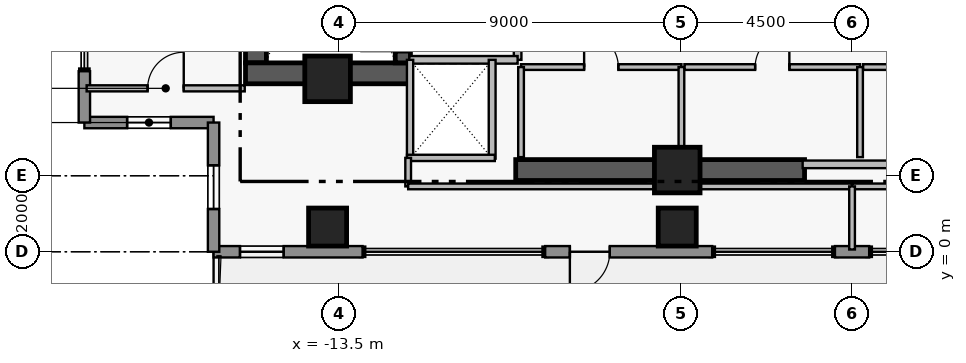
"""IFC4 building model, lengths in metres.
Left out: names, types, materials, properties, quantities, classifications, styles, units other than length and angle.
Written with IfcOpenShell. Run it as: python <this file> out.ifc"""

import sys

from ifc_helpers import new_model, si_unit, direction, frame, frame_2d, origin, origin_2d, place, context, subcontext, project, spatial, rectangle, extrude, element, fill, save


model = new_model("IFC4")
c1 = context("Model", 3, precision=1e-05, world=origin(), true_north=direction((0.0, 1.0)))
c2 = subcontext(c1, "Body", "Model", "MODEL_VIEW")
j1 = project(units=[si_unit("LENGTHUNIT", "METRE"), si_unit("PLANEANGLEUNIT", "RADIAN")], contexts=[c1])
p1 = place(None, origin())
s1 = spatial("IfcSite", under=j1, at=p1, CompositionType="ELEMENT")
p2 = place(p1, origin())
s2 = spatial("IfcBuilding", under=s1, at=p2, CompositionType="ELEMENT")
p3 = place(p2, frame((0.0, 0.0, 254.45)))
s3 = spatial("IfcBuildingStorey", under=s2, at=p3, CompositionType="ELEMENT", Elevation=254.45)
p4 = place(p3, frame((-15.685, 4.97, 0.0), z_axis=(0.0, 0.0, 1.0), x_axis=(0.0, 1.0, 0.0)))
e1 = element("IfcWall", 1, at=p4, inside=s3, PredefinedType="SHEAR", context=c2, shape_type="SweptSolid", body=[
    extrude(rectangle(XDim=8.96, YDim=0.55, at=frame_2d((4.48, 0.0))), origin(), (0.0, 0.0, 1.0), 3.51),
])
p5 = place(p3, frame((-15.96, 4.695, 0.0), z_axis=(0.0, 0.0, 1.0), x_axis=(1.0, 0.0, 0.0)))
e2 = element("IfcWall", 2, at=p5, inside=s3, PredefinedType="SHEAR", context=c2, shape_type="SweptSolid", body=[
    extrude(rectangle(XDim=4.36, YDim=0.55, at=frame_2d((2.18, 0.0))), origin(), (0.0, 0.0, 1.0), 3.51),
])
p6 = place(p3, frame((-8.85, 2.15, 0.0), z_axis=(0.0, 0.0, 1.0), x_axis=(1.0, 0.0, 0.0)))
e3 = element("IfcWall", 3, at=p6, inside=s3, PredefinedType="SHEAR", context=c2, shape_type="SweptSolid", body=[
    extrude(rectangle(XDim=7.6, YDim=0.55, at=frame_2d((3.8, 0.0))), origin(), (0.0, 0.0, 1.0), 3.48),
])
p7 = place(p3, frame((-11.82, 4.97, 0.0), z_axis=(0.0, 0.0, 1.0), x_axis=(0.0, 1.0, 0.0)))
e4 = element("IfcWall", 4, at=p7, inside=s3, PredefinedType="SHEAR", context=c2, shape_type="SweptSolid", body=[
    extrude(rectangle(XDim=8.96, YDim=0.4, at=frame_2d((4.48, 0.0))), origin(), (0.0, 0.0, 1.0), 3.51),
])
p8 = place(p7, frame((0.31, 0.0, 0.0)))
e5 = element("IfcOpeningElement", 5, at=p8, cuts=e4, PredefinedType="OPENING", context=c2, shape_type="SweptSolid", body=[
    extrude(rectangle(XDim=1.12, YDim=2.22, at=frame_2d((0.56, 1.11))), frame((0.0, 0.21, 0.0), z_axis=(0.0, -1.0, 0.0), x_axis=(1.0, 0.0, 0.0)), (0.0, 0.0, 1.0), 0.42),
])
for number, where, z_axis, x_axis in (
    (6, (-13.8, 4.55, 0.0), (0.0, 0.0, 1.0), (1.0, 0.0, 0.0)),
    (7, (-4.6, 2.15, 0.0), (0.0, 0.0, 1.0), (1.0, 0.0, 0.0)),
):
    element("IfcColumn", number, at=place(p3, frame(where, z_axis=z_axis, x_axis=x_axis)), inside=s3, PredefinedType="COLUMN", context=c2, shape_type="SweptSolid", body=[
        extrude(rectangle(XDim=1.2, YDim=1.2, at=origin_2d()), origin(), (0.0, 0.0, 1.0), 3.7),
    ])
for number, where, z_axis, x_axis in (
    (8, (-13.8, 0.65, 0.0), (0.0, 0.0, 1.0), (1.0, 0.0, 0.0)),
    (9, (-4.6, 0.65, 0.0), (0.0, 0.0, 1.0), (1.0, 0.0, 0.0)),
):
    element("IfcColumn", number, at=place(p3, frame(where, z_axis=z_axis, x_axis=x_axis)), inside=s3, PredefinedType="COLUMN", context=c2, shape_type="SweptSolid", body=[
        extrude(rectangle(XDim=1.0, YDim=1.0, at=origin_2d()), origin(), (0.0, 0.0, 1.0), 3.7),
    ])
p9 = place(p3, frame((-16.8, 3.4, 0.0), z_axis=(0.0, 0.0, 1.0), x_axis=(-1.0, 0.0, 0.0)))
e10 = element("IfcWall", 10, at=p9, inside=s3, PredefinedType="STANDARD", context=c2, shape_type="SweptSolid", body=[
    extrude(rectangle(XDim=3.4, YDim=0.3, at=frame_2d((1.7, 0.0))), origin(), (0.0, 0.0, 1.0), 3.48),
])
p10 = place(p9, frame((1.125, 0.0, 1.25)))
e11 = element("IfcOpeningElement", 11, at=p10, cuts=e10, PredefinedType="OPENING", context=c2, shape_type="SweptSolid", body=[
    extrude(rectangle(XDim=1.15, YDim=1.55, at=frame_2d((0.575, 0.775))), frame((0.0, 0.16, 0.0), z_axis=(0.0, -1.0, 0.0), x_axis=(1.0, 0.0, 0.0)), (0.0, 0.0, 1.0), 0.32),
])
p11 = place(p3, frame((-20.2, 3.4, 0.0), z_axis=(0.0, 0.0, 1.0), x_axis=(0.0, 1.0, 0.0)))
e12 = element("IfcWall", 12, at=p11, inside=s3, PredefinedType="STANDARD", context=c2, shape_type="SweptSolid", body=[
    extrude(rectangle(XDim=1.35, YDim=0.3, at=frame_2d((0.675, 0.0))), origin(), (0.0, 0.0, 1.0), 3.48),
])
p12 = place(p3, frame((0.45, 0.0, 0.0), z_axis=(0.0, 0.0, 1.0), x_axis=(-1.0, 0.0, 0.0)))
e13 = element("IfcWall", 13, at=p12, inside=s3, PredefinedType="STANDARD", context=c2, shape_type="SweptSolid", body=[
    extrude(rectangle(XDim=0.9, YDim=0.3, at=frame_2d((0.45, 0.0))), origin(), (0.0, 0.0, 1.0), 3.48),
])
p13 = place(p3, frame((-3.68, 0.0, 0.0), z_axis=(0.0, 0.0, 1.0), x_axis=(-1.0, 0.0, 0.0)))
e14 = element("IfcWall", 14, at=p13, inside=s3, PredefinedType="STANDARD", context=c2, shape_type="SweptSolid", body=[
    extrude(rectangle(XDim=4.395, YDim=0.3, at=frame_2d((2.198, 0.0))), origin(), (0.0, 0.0, 1.0), 3.48),
])
p14 = place(p13, frame((2.695, 0.0, 0.0)))
e15 = element("IfcOpeningElement", 15, at=p14, cuts=e14, PredefinedType="OPENING", context=c2, shape_type="SweptSolid", body=[
    extrude(rectangle(XDim=1.05, YDim=2.2, at=frame_2d((0.525, 1.1))), frame((0.0, 0.16, 0.0), z_axis=(0.0, -1.0, 0.0), x_axis=(1.0, 0.0, 0.0)), (0.0, 0.0, 1.0), 0.32),
])
p15 = place(p3, frame((-12.88, 0.0, 0.0), z_axis=(0.0, 0.0, 1.0), x_axis=(-1.0, 0.0, 0.0)))
e16 = element("IfcWall", 16, at=p15, inside=s3, PredefinedType="STANDARD", context=c2, shape_type="SweptSolid", body=[
    extrude(rectangle(XDim=3.92, YDim=0.3, at=frame_2d((1.96, 0.0))), origin(), (0.0, 0.0, 1.0), 3.48),
])
p16 = place(p15, frame((2.075, 0.0, 0.95)))
e17 = element("IfcOpeningElement", 17, at=p16, cuts=e16, PredefinedType="OPENING", context=c2, shape_type="SweptSolid", body=[
    extrude(rectangle(XDim=1.15, YDim=1.55, at=frame_2d((0.575, 0.775))), frame((0.0, 0.16, 0.0), z_axis=(0.0, -1.0, 0.0), x_axis=(1.0, 0.0, 0.0)), (0.0, 0.0, 1.0), 0.32),
])
p17 = place(p3, frame((-16.8, 0.0, 0.0), z_axis=(0.0, 0.0, 1.0), x_axis=(0.0, 1.0, 0.0)))
e18 = element("IfcWall", 18, at=p17, inside=s3, PredefinedType="STANDARD", context=c2, shape_type="SweptSolid", body=[
    extrude(rectangle(XDim=3.4, YDim=0.3, at=frame_2d((1.7, 0.0))), origin(), (0.0, 0.0, 1.0), 3.48),
])
p18 = place(p17, frame((1.125, 0.0, 1.25)))
e19 = element("IfcOpeningElement", 19, at=p18, cuts=e18, PredefinedType="OPENING", context=c2, shape_type="SweptSolid", body=[
    extrude(rectangle(XDim=1.15, YDim=1.55, at=frame_2d((0.575, 0.775))), frame((0.0, 0.16, 0.0), z_axis=(0.0, -1.0, 0.0), x_axis=(1.0, 0.0, 0.0)), (0.0, 0.0, 1.0), 0.32),
])
p19 = place(p3, frame((-8.8, 5.05, 0.0), z_axis=(0.0, 0.0, 1.0), x_axis=(0.0, 1.0, 0.0)))
e20 = element("IfcWall", 20, at=p19, inside=s3, PredefinedType="PARTITIONING", context=c2, shape_type="SweptSolid", body=[
    extrude(rectangle(XDim=6.1, YDim=0.2, at=frame_2d((3.05, 0.0))), origin(), (0.0, 0.0, 1.0), 3.48),
])
p20 = place(p19, frame((0.25, 0.0, 0.0)))
e21 = element("IfcOpeningElement", 21, at=p20, cuts=e20, PredefinedType="OPENING", context=c2, shape_type="SweptSolid", body=[
    extrude(rectangle(XDim=1.1, YDim=2.2, at=frame_2d((0.55, 1.1))), frame((0.0, 0.11, 0.0), z_axis=(0.0, -1.0, 0.0), x_axis=(1.0, 0.0, 0.0)), (0.0, 0.0, 1.0), 0.22),
])
p21 = place(p19, frame((3.85, 0.0, 0.0)))
e22 = element("IfcOpeningElement", 22, at=p21, cuts=e20, PredefinedType="OPENING", context=c2, shape_type="SweptSolid", body=[
    extrude(rectangle(XDim=1.1, YDim=2.2, at=frame_2d((0.55, 1.1))), frame((0.0, 0.11, 0.0), z_axis=(0.0, -1.0, 0.0), x_axis=(1.0, 0.0, 0.0)), (0.0, 0.0, 1.0), 0.22),
])
p22 = place(p3, frame((-8.71, 4.86, 0.0), z_axis=(0.0, 0.0, 1.0), x_axis=(1.0, 0.0, 0.0)))
e23 = element("IfcWall", 23, at=p22, inside=s3, PredefinedType="PARTITIONING", context=c2, shape_type="SweptSolid", body=[
    extrude(rectangle(XDim=4.22, YDim=0.15, at=frame_2d((2.11, 0.0))), origin(), (0.0, 0.0, 1.0), 3.48),
])
p23 = place(p22, frame((1.66, 0.0, 0.0)))
e24 = element("IfcOpeningElement", 24, at=p23, cuts=e23, PredefinedType="OPENING", context=c2, shape_type="SweptSolid", body=[
    extrude(rectangle(XDim=0.9, YDim=2.15, at=frame_2d((0.45, 1.075))), frame((0.0, 0.085, 0.0), z_axis=(0.0, -1.0, 0.0), x_axis=(1.0, 0.0, 0.0)), (0.0, 0.0, 1.0), 0.17),
])
p24 = place(p3, frame((-4.41, 4.86, 0.0), z_axis=(0.0, 0.0, 1.0), x_axis=(1.0, 0.0, 0.0)))
e25 = element("IfcWall", 25, at=p24, inside=s3, PredefinedType="PARTITIONING", context=c2, shape_type="SweptSolid", body=[
    extrude(rectangle(XDim=4.62, YDim=0.15, at=frame_2d((2.31, 0.0))), origin(), (0.0, 0.0, 1.0), 3.48),
])
p25 = place(p24, frame((1.86, 0.0, 0.0)))
e26 = element("IfcOpeningElement", 26, at=p25, cuts=e25, PredefinedType="OPENING", context=c2, shape_type="SweptSolid", body=[
    extrude(rectangle(XDim=0.9, YDim=2.15, at=frame_2d((0.45, 1.075))), frame((0.0, 0.085, 0.0), z_axis=(0.0, -1.0, 0.0), x_axis=(1.0, 0.0, 0.0)), (0.0, 0.0, 1.0), 0.17),
])
p26 = place(p3, frame((0.29, 4.86, 0.0), z_axis=(0.0, 0.0, 1.0), x_axis=(1.0, 0.0, 0.0)))
e27 = element("IfcWall", 27, at=p26, inside=s3, PredefinedType="PARTITIONING", context=c2, shape_type="SweptSolid", body=[
    extrude(rectangle(XDim=3.42, YDim=0.15, at=frame_2d((1.71, 0.0))), origin(), (0.0, 0.0, 1.0), 3.48),
])
p27 = place(p26, frame((1.26, 0.0, 0.0)))
e28 = element("IfcOpeningElement", 28, at=p27, cuts=e27, PredefinedType="OPENING", context=c2, shape_type="SweptSolid", body=[
    extrude(rectangle(XDim=0.9, YDim=2.15, at=frame_2d((0.45, 1.075))), frame((0.0, 0.085, 0.0), z_axis=(0.0, -1.0, 0.0), x_axis=(1.0, 0.0, 0.0)), (0.0, 0.0, 1.0), 0.17),
])
p28 = place(p3, frame((-20.14, 4.3, 0.0), z_axis=(0.0, 0.0, 1.0), x_axis=(1.0, 0.0, 0.0)))
e29 = element("IfcWall", 29, at=p28, inside=s3, PredefinedType="PARTITIONING", context=c2, shape_type="SweptSolid", body=[
    extrude(rectangle(XDim=4.16, YDim=0.16, at=frame_2d((2.08, 0.0))), origin(), (0.0, 0.0, 1.0), 3.48),
])
p29 = place(p28, frame((1.605, 0.0, 0.0)))
e30 = element("IfcOpeningElement", 30, at=p29, cuts=e29, PredefinedType="OPENING", context=c2, shape_type="SweptSolid", body=[
    extrude(rectangle(XDim=0.95, YDim=2.15, at=frame_2d((0.475, 1.075))), frame((0.0, 0.09, 0.0), z_axis=(0.0, -1.0, 0.0), x_axis=(1.0, 0.0, 0.0)), (0.0, 0.0, 1.0), 0.18),
])
p30 = place(p3, frame((-11.65, 5.05, 0.0), z_axis=(0.0, 0.0, 1.0), x_axis=(1.0, 0.0, 0.0)))
e31 = element("IfcWall", 31, at=p30, inside=s3, PredefinedType="PARTITIONING", context=c2, shape_type="SweptSolid", body=[
    extrude(rectangle(XDim=2.85, YDim=0.2, at=frame_2d((1.425, 0.0))), origin(), (0.0, 0.0, 1.0), 3.48),
])
p31 = place(p3, frame((-1.3, 2.3, 0.0), z_axis=(0.0, 0.0, 1.0), x_axis=(1.0, 0.0, 0.0)))
e32 = element("IfcWall", 32, at=p31, inside=s3, PredefinedType="PARTITIONING", context=c2, shape_type="SweptSolid", body=[
    extrude(rectangle(XDim=2.6, YDim=0.2, at=frame_2d((1.3, 0.0))), origin(), (0.0, 0.0, 1.0), 2.38),
])
for number, where, z_axis, x_axis in (
    (33, (-8.71, 2.49, 0.0), (0.0, 0.0, 1.0), (0.0, 1.0, 0.0)),
    (34, (-4.49, 2.49, 0.0), (0.0, 0.0, 1.0), (0.0, 1.0, 0.0)),
    (35, (0.21, 2.49, 0.0), (0.0, 0.0, 1.0), (0.0, 1.0, 0.0)),
):
    element("IfcWall", number, at=place(p3, frame(where, z_axis=z_axis, x_axis=x_axis)), inside=s3, PredefinedType="PARTITIONING", context=c2, shape_type="SweptSolid", body=[
        extrude(rectangle(XDim=2.37, YDim=0.15, at=frame_2d((1.185, 0.0))), origin(), (0.0, 0.0, 1.0), 3.48),
    ])
p32 = place(p3, frame((-9.47, 2.45, 0.0), z_axis=(0.0, 0.0, 1.0), x_axis=(0.0, 1.0, 0.0)))
e36 = element("IfcWall", 36, at=p32, inside=s3, PredefinedType="PARTITIONING", context=c2, shape_type="SweptSolid", body=[
    extrude(rectangle(XDim=2.6, YDim=0.18, at=frame_2d((1.3, 0.0))), origin(), (0.0, 0.0, 1.0), 3.48),
])
p33 = place(p3, frame((-11.63, 2.47, 0.0), z_axis=(0.0, 0.0, 1.0), x_axis=(0.0, 1.0, 0.0)))
e37 = element("IfcWall", 37, at=p33, inside=s3, PredefinedType="PARTITIONING", context=c2, shape_type="SweptSolid", body=[
    extrude(rectangle(XDim=2.58, YDim=0.165, at=frame_2d((1.29, 0.0))), origin(), (0.0, 0.0, 1.0), 3.48),
])
p34 = place(p3, frame((-11.71, 2.47, 0.0), z_axis=(0.0, 0.0, 1.0), x_axis=(1.0, 0.0, 0.0)))
e38 = element("IfcWall", 38, at=p34, inside=s3, PredefinedType="PARTITIONING", context=c2, shape_type="SweptSolid", body=[
    extrude(rectangle(XDim=2.31, YDim=0.165, at=frame_2d((1.155, 0.0))), origin(), (0.0, 0.0, 1.0), 2.38),
])
p35 = place(p3, frame((-11.68, 1.72, 0.0), z_axis=(0.0, 0.0, 1.0), x_axis=(0.0, 1.0, 0.0)))
e39 = element("IfcWall", 39, at=p35, inside=s3, PredefinedType="PARTITIONING", context=c2, shape_type="SweptSolid", body=[
    extrude(rectangle(XDim=0.75, YDim=0.15, at=frame_2d((0.375, 0.0))), origin(), (0.0, 0.0, 1.0), 3.48),
])
for number, where, z_axis, x_axis in (
    (40, (-11.68, 1.72, 0.0), (0.0, 0.0, 1.0), (1.0, 0.0, 0.0)),
    (41, (0.0, 1.72, 0.0), (0.0, 0.0, 1.0), (1.0, 0.0, 0.0)),
):
    element("IfcWall", number, at=place(p3, frame(where, z_axis=z_axis, x_axis=x_axis)), inside=s3, PredefinedType="PARTITIONING", context=c2, shape_type="SweptSolid", body=[
        extrude(rectangle(XDim=11.68, YDim=0.15, at=frame_2d((5.84, 0.0))), origin(), (0.0, 0.0, 1.0), 2.38),
    ])
p36 = place(p3, frame((0.0, 0.06, 0.0), z_axis=(0.0, 0.0, 1.0), x_axis=(0.0, 1.0, 0.0)))
e42 = element("IfcWall", 42, at=p36, inside=s3, PredefinedType="PARTITIONING", context=c2, shape_type="SweptSolid", body=[
    extrude(rectangle(XDim=1.66, YDim=0.15, at=frame_2d((0.83, 0.0))), origin(), (0.0, 0.0, 1.0), 3.48),
])
p37 = place(p10, origin())
e43 = element("IfcWindow", 43, at=p37, inside=s3, PartitioningType="SINGLE_PANEL", PredefinedType="WINDOW", context=c2, shape_type="SweptSolid", body=[
    extrude(rectangle(XDim=1.15, YDim=1.55, at=frame_2d((0.575, 0.775))), frame((0.0, 0.03, 0.0), z_axis=(0.0, -1.0, 0.0), x_axis=(1.0, 0.0, 0.0)), (0.0, 0.0, 1.0), 0.06),
])
fill(e11, e43)
p38 = place(p14, origin())
e44 = element("IfcDoor", 44, at=p38, inside=s3, OperationType="SINGLE_SWING_RIGHT", PredefinedType="DOOR", context=c2, shape_type="SweptSolid", body=[
    extrude(rectangle(XDim=1.05, YDim=2.2, at=frame_2d((0.525, 1.1))), frame((0.0, 0.025, 0.0), z_axis=(0.0, -1.0, 0.0), x_axis=(1.0, 0.0, 0.0)), (0.0, 0.0, 1.0), 0.05),
])
fill(e15, e44)
p39 = place(p16, origin())
e45 = element("IfcWindow", 45, at=p39, inside=s3, PartitioningType="SINGLE_PANEL", PredefinedType="WINDOW", context=c2, shape_type="SweptSolid", body=[
    extrude(rectangle(XDim=1.15, YDim=1.55, at=frame_2d((0.575, 0.775))), frame((0.0, 0.03, 0.0), z_axis=(0.0, -1.0, 0.0), x_axis=(1.0, 0.0, 0.0)), (0.0, 0.0, 1.0), 0.06),
])
fill(e17, e45)
p40 = place(p18, origin())
e46 = element("IfcWindow", 46, at=p40, inside=s3, PartitioningType="SINGLE_PANEL", PredefinedType="WINDOW", context=c2, shape_type="SweptSolid", body=[
    extrude(rectangle(XDim=1.15, YDim=1.55, at=frame_2d((0.575, 0.775))), frame((0.0, 0.03, 0.0), z_axis=(0.0, -1.0, 0.0), x_axis=(1.0, 0.0, 0.0)), (0.0, 0.0, 1.0), 0.06),
])
fill(e19, e46)
p41 = place(p23, origin())
e47 = element("IfcDoor", 47, at=p41, inside=s3, OperationType="SINGLE_SWING_LEFT", PredefinedType="DOOR", context=c2, shape_type="SweptSolid", body=[
    extrude(rectangle(XDim=0.9, YDim=2.15, at=frame_2d((0.45, 1.075))), frame((0.0, 0.025, 0.0), z_axis=(0.0, -1.0, 0.0), x_axis=(1.0, 0.0, 0.0)), (0.0, 0.0, 1.0), 0.05),
])
fill(e24, e47)
p42 = place(p25, origin())
e48 = element("IfcDoor", 48, at=p42, inside=s3, OperationType="SINGLE_SWING_RIGHT", PredefinedType="DOOR", context=c2, shape_type="SweptSolid", body=[
    extrude(rectangle(XDim=0.9, YDim=2.15, at=frame_2d((0.45, 1.075))), frame((0.0, 0.025, 0.0), z_axis=(0.0, -1.0, 0.0), x_axis=(1.0, 0.0, 0.0)), (0.0, 0.0, 1.0), 0.05),
])
fill(e26, e48)
p43 = place(p29, origin())
e49 = element("IfcDoor", 49, at=p43, inside=s3, OperationType="SINGLE_SWING_RIGHT", PredefinedType="DOOR", context=c2, shape_type="SweptSolid", body=[
    extrude(rectangle(XDim=0.95, YDim=2.15, at=frame_2d((0.475, 1.075))), frame((0.0, 0.025, 0.0), z_axis=(0.0, -1.0, 0.0), x_axis=(1.0, 0.0, 0.0)), (0.0, 0.0, 1.0), 0.05),
])
fill(e30, e49)
save(model, sys.argv[1])
